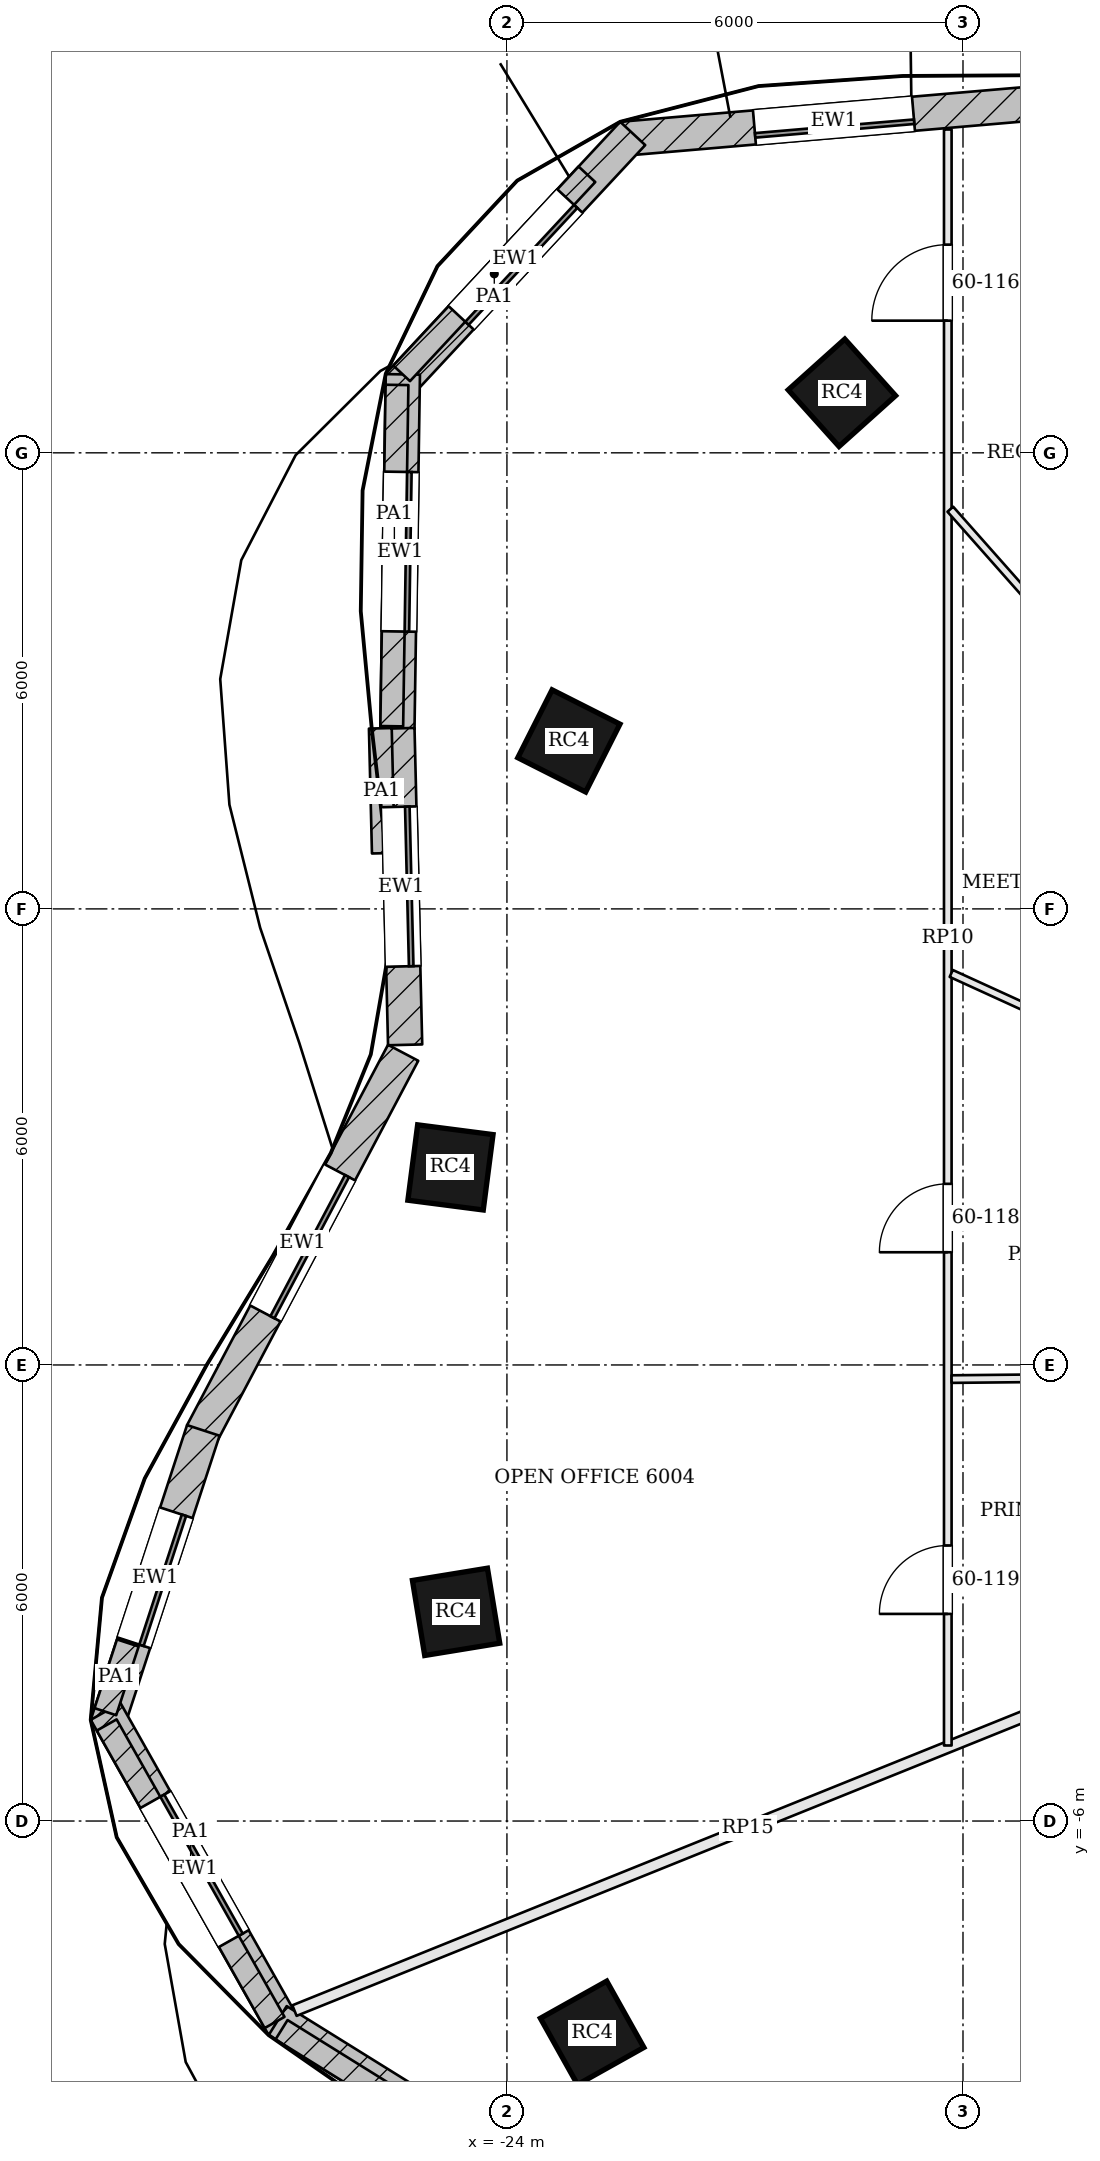
"""IFC4 building model, lengths in metres.
Left out: names, types, materials, properties, quantities, classifications, styles, units other than length and angle.
Written with IfcOpenShell. Run it as: python <this file> out.ifc"""

import sys

from ifc_helpers import new_model, si_unit, direction, frame, frame_2d, origin, origin_2d, place, context, subcontext, project, spatial, rectangle, extrude, element, fill, save


model = new_model("IFC4")
c1 = context("Model", 3, precision=1e-05, world=origin(), true_north=direction((0.0, 1.0)))
c2 = subcontext(c1, "Body", "Model", "MODEL_VIEW")
j1 = project(units=[si_unit("LENGTHUNIT", "METRE"), si_unit("PLANEANGLEUNIT", "RADIAN")], contexts=[c1])
p1 = place(None, origin())
s1 = spatial("IfcSite", under=j1, at=p1, CompositionType="ELEMENT")
p2 = place(p1, origin())
s2 = spatial("IfcBuilding", under=s1, at=p2, CompositionType="ELEMENT")
p3 = place(p2, frame((0.0, 0.0, 244.8)))
s3 = spatial("IfcBuildingStorey", under=s2, at=p3, CompositionType="ELEMENT", Elevation=244.8)
for number, where, z_axis, x_axis in (
    (1, (-19.593, 12.79, 0.0), (0.0, 0.0, 1.0), (-0.744, -0.668, 0.0)),
    (2, (-23.185, 8.21, 0.0), (0.0, 0.0, 1.0), (-0.451, -0.893, 0.0)),
    (3, (-24.743, 2.599, 0.0), (0.0, 0.0, 1.0), (-0.128, -0.992, 0.0)),
    (4, (-24.669, -3.248, 0.0), (0.0, 0.0, 1.0), (0.162, -0.987, 0.0)),
    (5, (-22.879, -8.787, 0.0), (0.0, 0.0, 1.0), (0.489, -0.873, 0.0)),
):
    element("IfcColumn", number, at=place(p3, frame(where, z_axis=z_axis, x_axis=x_axis)), inside=s3, PredefinedType="COLUMN", context=c2, shape_type="SweptSolid", body=[
        extrude(rectangle(XDim=1.0, YDim=1.0, at=origin_2d()), origin(), (0.0, 0.0, 1.0), 3.9),
    ])
p4 = place(p3, frame((-16.91, 16.61, 0.0), z_axis=(0.0, 0.0, 1.0), x_axis=(-0.996333165816, -0.085558299972, 0.0)))
e6 = element("IfcWall", 6, at=p4, inside=s3, PredefinedType="SOLIDWALL", context=c2, shape_type="SweptSolid", body=[
    extrude(rectangle(XDim=5.596, YDim=0.45, at=frame_2d((2.798, 0.0))), origin(), (0.0, 0.0, 1.0), 3.7),
])
p5 = place(p4, frame((1.748, 0.0, 0.9)))
e7 = element("IfcOpeningElement", 7, at=p5, cuts=e6, PredefinedType="OPENING", context=c2, shape_type="SweptSolid", body=[
    extrude(rectangle(XDim=2.1, YDim=2.3, at=frame_2d((1.05, 1.15))), frame((0.0, 0.235, 0.0), z_axis=(0.0, -1.0, 0.0), x_axis=(1.0, 0.0, 0.0)), (0.0, 0.0, 1.0), 0.47),
])
p6 = place(p3, frame((-22.345, 16.202, 0.0), z_axis=(0.0, 0.0, 1.0), x_axis=(-0.681249161265, -0.732051624051, 0.0)))
e8 = element("IfcWall", 8, at=p6, inside=s3, PredefinedType="SOLIDWALL", context=c2, shape_type="SweptSolid", body=[
    extrude(rectangle(XDim=4.527, YDim=0.45, at=frame_2d((2.263, 0.0))), origin(), (0.0, 0.0, 1.0), 3.7),
])
p7 = place(p6, frame((1.213, 0.0, 0.9)))
e9 = element("IfcOpeningElement", 9, at=p7, cuts=e8, PredefinedType="OPENING", context=c2, shape_type="SweptSolid", body=[
    extrude(rectangle(XDim=2.1, YDim=2.3, at=frame_2d((1.05, 1.15))), frame((0.0, 0.235, 0.0), z_axis=(0.0, -1.0, 0.0), x_axis=(1.0, 0.0, 0.0)), (0.0, 0.0, 1.0), 0.47),
])
p8 = place(p3, frame((-25.369, 13.032, 0.0), z_axis=(0.0, 0.0, 1.0), x_axis=(-0.015383599855, -0.999881665426, 0.0)))
e10 = element("IfcWall", 10, at=p8, inside=s3, PredefinedType="SOLIDWALL", context=c2, shape_type="SweptSolid", body=[
    extrude(rectangle(XDim=4.666, YDim=0.45, at=frame_2d((2.333, 0.0))), origin(), (0.0, 0.0, 1.0), 3.7),
])
p9 = place(p8, frame((1.283, 0.0, 0.9)))
e11 = element("IfcOpeningElement", 11, at=p9, cuts=e10, PredefinedType="OPENING", context=c2, shape_type="SweptSolid", body=[
    extrude(rectangle(XDim=2.1, YDim=2.3, at=frame_2d((1.05, 1.15))), frame((0.0, 0.235, 0.0), z_axis=(0.0, -1.0, 0.0), x_axis=(1.0, 0.0, 0.0)), (0.0, 0.0, 1.0), 0.47),
])
p10 = place(p3, frame((-25.441, 8.375, 0.0), z_axis=(0.0, 0.0, 1.0), x_axis=(0.024385850259, -0.999702620936, 0.0)))
e12 = element("IfcWall", 12, at=p10, inside=s3, PredefinedType="SOLIDWALL", context=c2, shape_type="SweptSolid", body=[
    extrude(rectangle(XDim=4.165, YDim=0.45, at=frame_2d((2.083, 0.0))), origin(), (0.0, 0.0, 1.0), 3.7),
])
p11 = place(p10, frame((1.032, 0.0, 0.9)))
e13 = element("IfcOpeningElement", 13, at=p11, cuts=e12, PredefinedType="OPENING", context=c2, shape_type="SweptSolid", body=[
    extrude(rectangle(XDim=2.1, YDim=2.3, at=frame_2d((1.05, 1.15))), frame((0.0, 0.235, 0.0), z_axis=(0.0, -1.0, 0.0), x_axis=(1.0, 0.0, 0.0)), (0.0, 0.0, 1.0), 0.47),
])
p12 = place(p3, frame((-25.365, 4.107, 0.0), z_axis=(0.0, 0.0, 1.0), x_axis=(-0.467239399168, -0.884130840919, 0.0)))
e14 = element("IfcWall", 14, at=p12, inside=s3, PredefinedType="SOLIDWALL", context=c2, shape_type="SweptSolid", body=[
    extrude(rectangle(XDim=5.659, YDim=0.45, at=frame_2d((2.83, 0.0))), origin(), (0.0, 0.0, 1.0), 3.7),
])
p13 = place(p12, frame((1.779, 0.0, 0.9)))
e15 = element("IfcOpeningElement", 15, at=p13, cuts=e14, PredefinedType="OPENING", context=c2, shape_type="SweptSolid", body=[
    extrude(rectangle(XDim=2.1, YDim=2.3, at=frame_2d((1.05, 1.15))), frame((0.0, 0.235, 0.0), z_axis=(0.0, -1.0, 0.0), x_axis=(1.0, 0.0, 0.0)), (0.0, 0.0, 1.0), 0.47),
])
p14 = place(p3, frame((-27.995, -0.861, 0.0), z_axis=(0.0, 0.0, 1.0), x_axis=(-0.310693110673, -0.950510279261, 0.0)))
e16 = element("IfcWall", 16, at=p14, inside=s3, PredefinedType="SOLIDWALL", context=c2, shape_type="SweptSolid", body=[
    extrude(rectangle(XDim=4.08, YDim=0.45, at=frame_2d((2.04, 0.0))), origin(), (0.0, 0.0, 1.0), 3.7),
])
p15 = place(p14, frame((1.14, 0.0, 0.9)))
e17 = element("IfcOpeningElement", 17, at=p15, cuts=e16, PredefinedType="OPENING", context=c2, shape_type="SweptSolid", body=[
    extrude(rectangle(XDim=1.8, YDim=2.3, at=frame_2d((0.9, 1.15))), frame((0.0, 0.235, 0.0), z_axis=(0.0, -1.0, 0.0), x_axis=(1.0, 0.0, 0.0)), (0.0, 0.0, 1.0), 0.47),
])
p16 = place(p3, frame((-29.28, -4.558, 0.0), z_axis=(0.0, 0.0, 1.0), x_axis=(0.491511608999, -0.870871022723, 0.0)))
e18 = element("IfcWall", 18, at=p16, inside=s3, PredefinedType="SOLIDWALL", context=c2, shape_type="SweptSolid", body=[
    extrude(rectangle(XDim=4.763, YDim=0.45, at=frame_2d((2.381, 0.0))), origin(), (0.0, 0.0, 1.0), 3.7),
])
p17 = place(p16, frame((1.332, 0.0, 0.9)))
e19 = element("IfcOpeningElement", 19, at=p17, cuts=e18, PredefinedType="OPENING", context=c2, shape_type="SweptSolid", body=[
    extrude(rectangle(XDim=2.1, YDim=2.3, at=frame_2d((1.05, 1.15))), frame((0.0, 0.235, 0.0), z_axis=(0.0, -1.0, 0.0), x_axis=(1.0, 0.0, 0.0)), (0.0, 0.0, 1.0), 0.47),
])
p18 = place(p3, frame((-27.016, -8.626, 0.0), z_axis=(0.0, 0.0, 1.0), x_axis=(0.849198377377, -0.528073968172, 0.0)))
e20 = element("IfcWall", 20, at=p18, inside=s3, PredefinedType="SOLIDWALL", context=c2, shape_type="SweptSolid", body=[
    extrude(rectangle(XDim=5.99, YDim=0.45, at=frame_2d((2.995, 0.0))), origin(), (0.0, 0.0, 1.0), 3.7),
])
p19 = place(p18, frame((1.945, 0.0, 0.9)))
e21 = element("IfcOpeningElement", 21, at=p19, cuts=e20, PredefinedType="OPENING", context=c2, shape_type="SweptSolid", body=[
    extrude(rectangle(XDim=2.1, YDim=2.3, at=frame_2d((1.05, 1.15))), frame((0.0, 0.235, 0.0), z_axis=(0.0, -1.0, 0.0), x_axis=(1.0, 0.0, 0.0)), (0.0, 0.0, 1.0), 0.47),
])
p20 = place(p3, frame((-22.948, 15.665, 3.9), z_axis=(0.0, 0.0, 1.0), x_axis=(-0.681269800001, -0.732032417046, 0.0)))
e22 = element("IfcWall", 22, at=p20, inside=s3, PredefinedType="PARAPET", context=c2, shape_type="SweptSolid", body=[
    extrude(rectangle(XDim=3.578, YDim=0.3, at=frame_2d((1.789, 0.0))), origin(), (0.0, 0.0, 1.0), 1.1),
])
p21 = place(p3, frame((-25.446, 12.893, 3.9), z_axis=(0.0, 0.0, 1.0), x_axis=(-0.015386139974, -0.999881626342, 0.0)))
e23 = element("IfcWall", 23, at=p21, inside=s3, PredefinedType="PARAPET", context=c2, shape_type="SweptSolid", body=[
    extrude(rectangle(XDim=4.49, YDim=0.3, at=frame_2d((2.245, 0.0))), origin(), (0.0, 0.0, 1.0), 1.1),
])
p22 = place(p3, frame((-25.666, 8.376, 3.9), z_axis=(0.0, 0.0, 1.0), x_axis=(0.024357650064, -0.999703308429, 0.0)))
e24 = element("IfcWall", 24, at=p22, inside=s3, PredefinedType="PARAPET", context=c2, shape_type="SweptSolid", body=[
    extrude(rectangle(XDim=1.644, YDim=0.3, at=frame_2d((0.822, 0.0))), origin(), (0.0, 0.0, 1.0), 1.1),
])
p23 = place(p3, frame((-28.988, -3.657, 3.9), z_axis=(0.0, 0.0, 1.0), x_axis=(-0.310832502734, -0.950464704891, 0.0)))
e25 = element("IfcWall", 25, at=p23, inside=s3, PredefinedType="PARAPET", context=c2, shape_type="SweptSolid", body=[
    extrude(rectangle(XDim=0.951, YDim=0.3, at=frame_2d((0.476, 0.0))), origin(), (0.0, 0.0, 1.0), 1.1),
])
p24 = place(p3, frame((-29.266, -4.737, 3.9), z_axis=(0.0, 0.0, 1.0), x_axis=(0.491480740547, -0.870888443873, 0.0)))
e26 = element("IfcWall", 26, at=p24, inside=s3, PredefinedType="PARAPET", context=c2, shape_type="SweptSolid", body=[
    extrude(rectangle(XDim=4.494, YDim=0.3, at=frame_2d((2.247, 0.0))), origin(), (0.0, 0.0, 1.0), 1.1),
])
p25 = place(p3, frame((-26.965, -8.746, 3.9), z_axis=(0.0, 0.0, 1.0), x_axis=(0.849203312007, -0.528066032686, 0.0)))
e27 = element("IfcWall", 27, at=p25, inside=s3, PredefinedType="PARAPET", context=c2, shape_type="SweptSolid", body=[
    extrude(rectangle(XDim=4.113, YDim=0.3, at=frame_2d((2.056, 0.0))), origin(), (0.0, 0.0, 1.0), 1.1),
])
p26 = place(p3, frame((-26.795, -8.494, 0.0), z_axis=(0.0, 0.0, 1.0), x_axis=(0.927430744247, 0.373994939304, 0.0)))
e28 = element("IfcWall", 28, at=p26, inside=s3, PredefinedType="PARTITIONING", context=c2, shape_type="SweptSolid", body=[
    extrude(rectangle(XDim=12.859, YDim=0.15, at=frame_2d((6.429, 0.0))), origin(), (0.0, 0.0, 1.0), 3.084),
])
p27 = place(p3, frame((-18.2, -5.006, 0.0), z_axis=(0.0, 0.0, 1.0), x_axis=(0.0, 1.0, 0.0)))
e29 = element("IfcWall", 29, at=p27, inside=s3, PredefinedType="PARTITIONING", context=c2, shape_type="SweptSolid", body=[
    extrude(rectangle(XDim=21.26, YDim=0.1, at=frame_2d((10.63, 0.0))), origin(), (0.0, 0.0, 1.0), 3.084),
])
p28 = place(p27, frame((18.745, 0.0, 0.0)))
e30 = element("IfcOpeningElement", 30, at=p28, cuts=e29, PredefinedType="OPENING", context=c2, shape_type="SweptSolid", body=[
    extrude(rectangle(XDim=1.0, YDim=2.1, at=frame_2d((0.5, 1.05))), frame((0.0, 0.06, 0.0), z_axis=(0.0, -1.0, 0.0), x_axis=(1.0, 0.0, 0.0)), (0.0, 0.0, 1.0), 0.12),
])
p29 = place(p27, frame((6.489, 0.0, 0.0)))
e31 = element("IfcOpeningElement", 31, at=p29, cuts=e29, PredefinedType="OPENING", context=c2, shape_type="SweptSolid", body=[
    extrude(rectangle(XDim=0.9, YDim=2.1, at=frame_2d((0.45, 1.05))), frame((0.0, 0.06, 0.0), z_axis=(0.0, -1.0, 0.0), x_axis=(1.0, 0.0, 0.0)), (0.0, 0.0, 1.0), 0.12),
])
p30 = place(p27, frame((1.731, 0.0, 0.0)))
e32 = element("IfcOpeningElement", 32, at=p30, cuts=e29, PredefinedType="OPENING", context=c2, shape_type="SweptSolid", body=[
    extrude(rectangle(XDim=0.9, YDim=2.1, at=frame_2d((0.45, 1.05))), frame((0.0, 0.06, 0.0), z_axis=(0.0, -1.0, 0.0), x_axis=(1.0, 0.0, 0.0)), (0.0, 0.0, 1.0), 0.12),
])
p31 = place(p3, frame((-14.85, 7.514, 0.0), z_axis=(0.0, 0.0, 1.0), x_axis=(-0.663136045348, 0.748498888015, 0.0)))
e33 = element("IfcWall", 33, at=p31, inside=s3, PredefinedType="PARTITIONING", context=c2, shape_type="SweptSolid", body=[
    extrude(rectangle(XDim=5.002, YDim=0.1, at=frame_2d((2.501, 0.0))), origin(), (0.0, 0.0, 1.0), 3.084),
])
p32 = place(p3, frame((-14.868, 3.649, 0.0), z_axis=(0.0, 0.0, 1.0), x_axis=(-0.909566433152, 0.41555854423, 0.0)))
e34 = element("IfcWall", 34, at=p32, inside=s3, PredefinedType="PARTITIONING", context=c2, shape_type="SweptSolid", body=[
    extrude(rectangle(XDim=3.613, YDim=0.1, at=frame_2d((1.807, 0.0))), origin(), (0.0, 0.0, 1.0), 3.084),
])
p33 = place(p3, frame((-14.875, -0.154, 0.0), z_axis=(0.0, 0.0, 1.0), x_axis=(-0.999952316851, -0.009765450537, 0.0)))
e35 = element("IfcWall", 35, at=p33, inside=s3, PredefinedType="PARTITIONING", context=c2, shape_type="SweptSolid", body=[
    extrude(rectangle(XDim=3.275, YDim=0.1, at=frame_2d((1.638, 0.0))), origin(), (0.0, 0.0, 1.0), 3.084),
])
p34 = place(p5, origin())
e36 = element("IfcWindow", 36, at=p34, inside=s3, PartitioningType="SINGLE_PANEL", PredefinedType="WINDOW", context=c2, shape_type="SweptSolid", body=[
    extrude(rectangle(XDim=2.1, YDim=2.3, at=frame_2d((1.05, 1.15))), frame((0.0, 0.135, 0.0), z_axis=(0.0, -1.0, 0.0), x_axis=(1.0, 0.0, 0.0)), (0.0, 0.0, 1.0), 0.06),
])
fill(e7, e36)
p35 = place(p7, origin())
e37 = element("IfcWindow", 37, at=p35, inside=s3, PartitioningType="SINGLE_PANEL", PredefinedType="WINDOW", context=c2, shape_type="SweptSolid", body=[
    extrude(rectangle(XDim=2.1, YDim=2.3, at=frame_2d((1.05, 1.15))), frame((0.0, 0.135, 0.0), z_axis=(0.0, -1.0, 0.0), x_axis=(1.0, 0.0, 0.0)), (0.0, 0.0, 1.0), 0.06),
])
fill(e9, e37)
p36 = place(p9, origin())
e38 = element("IfcWindow", 38, at=p36, inside=s3, PartitioningType="SINGLE_PANEL", PredefinedType="WINDOW", context=c2, shape_type="SweptSolid", body=[
    extrude(rectangle(XDim=2.1, YDim=2.3, at=frame_2d((1.05, 1.15))), frame((0.0, 0.135, 0.0), z_axis=(0.0, -1.0, 0.0), x_axis=(1.0, 0.0, 0.0)), (0.0, 0.0, 1.0), 0.06),
])
fill(e11, e38)
p37 = place(p11, origin())
e39 = element("IfcWindow", 39, at=p37, inside=s3, PartitioningType="SINGLE_PANEL", PredefinedType="WINDOW", context=c2, shape_type="SweptSolid", body=[
    extrude(rectangle(XDim=2.1, YDim=2.3, at=frame_2d((1.05, 1.15))), frame((0.0, 0.135, 0.0), z_axis=(0.0, -1.0, 0.0), x_axis=(1.0, 0.0, 0.0)), (0.0, 0.0, 1.0), 0.06),
])
fill(e13, e39)
p38 = place(p13, origin())
e40 = element("IfcWindow", 40, at=p38, inside=s3, PartitioningType="SINGLE_PANEL", PredefinedType="WINDOW", context=c2, shape_type="SweptSolid", body=[
    extrude(rectangle(XDim=2.1, YDim=2.3, at=frame_2d((1.05, 1.15))), frame((0.0, 0.135, 0.0), z_axis=(0.0, -1.0, 0.0), x_axis=(1.0, 0.0, 0.0)), (0.0, 0.0, 1.0), 0.06),
])
fill(e15, e40)
p39 = place(p15, origin())
e41 = element("IfcWindow", 41, at=p39, inside=s3, PartitioningType="SINGLE_PANEL", PredefinedType="WINDOW", context=c2, shape_type="SweptSolid", body=[
    extrude(rectangle(XDim=1.8, YDim=2.3, at=frame_2d((0.9, 1.15))), frame((0.0, 0.135, 0.0), z_axis=(0.0, -1.0, 0.0), x_axis=(1.0, 0.0, 0.0)), (0.0, 0.0, 1.0), 0.06),
])
fill(e17, e41)
p40 = place(p17, origin())
e42 = element("IfcWindow", 42, at=p40, inside=s3, PartitioningType="SINGLE_PANEL", PredefinedType="WINDOW", context=c2, shape_type="SweptSolid", body=[
    extrude(rectangle(XDim=2.1, YDim=2.3, at=frame_2d((1.05, 1.15))), frame((0.0, 0.135, 0.0), z_axis=(0.0, -1.0, 0.0), x_axis=(1.0, 0.0, 0.0)), (0.0, 0.0, 1.0), 0.06),
])
fill(e19, e42)
p41 = place(p28, origin())
e43 = element("IfcDoor", 43, at=p41, inside=s3, OperationType="SINGLE_SWING_LEFT", PredefinedType="DOOR", context=c2, shape_type="SweptSolid", body=[
    extrude(rectangle(XDim=1.0, YDim=2.1, at=frame_2d((0.5, 1.05))), frame((0.0, 0.025, 0.0), z_axis=(0.0, -1.0, 0.0), x_axis=(1.0, 0.0, 0.0)), (0.0, 0.0, 1.0), 0.05),
])
fill(e30, e43)
p42 = place(p29, origin())
e44 = element("IfcDoor", 44, at=p42, inside=s3, OperationType="SINGLE_SWING_LEFT", PredefinedType="DOOR", context=c2, shape_type="SweptSolid", body=[
    extrude(rectangle(XDim=0.9, YDim=2.1, at=frame_2d((0.45, 1.05))), frame((0.0, 0.025, 0.0), z_axis=(0.0, -1.0, 0.0), x_axis=(1.0, 0.0, 0.0)), (0.0, 0.0, 1.0), 0.05),
])
fill(e31, e44)
p43 = place(p30, origin())
e45 = element("IfcDoor", 45, at=p43, inside=s3, OperationType="SINGLE_SWING_LEFT", PredefinedType="DOOR", context=c2, shape_type="SweptSolid", body=[
    extrude(rectangle(XDim=0.9, YDim=2.1, at=frame_2d((0.45, 1.05))), frame((0.0, 0.025, 0.0), z_axis=(0.0, -1.0, 0.0), x_axis=(1.0, 0.0, 0.0)), (0.0, 0.0, 1.0), 0.05),
])
fill(e32, e45)
save(model, sys.argv[1])
